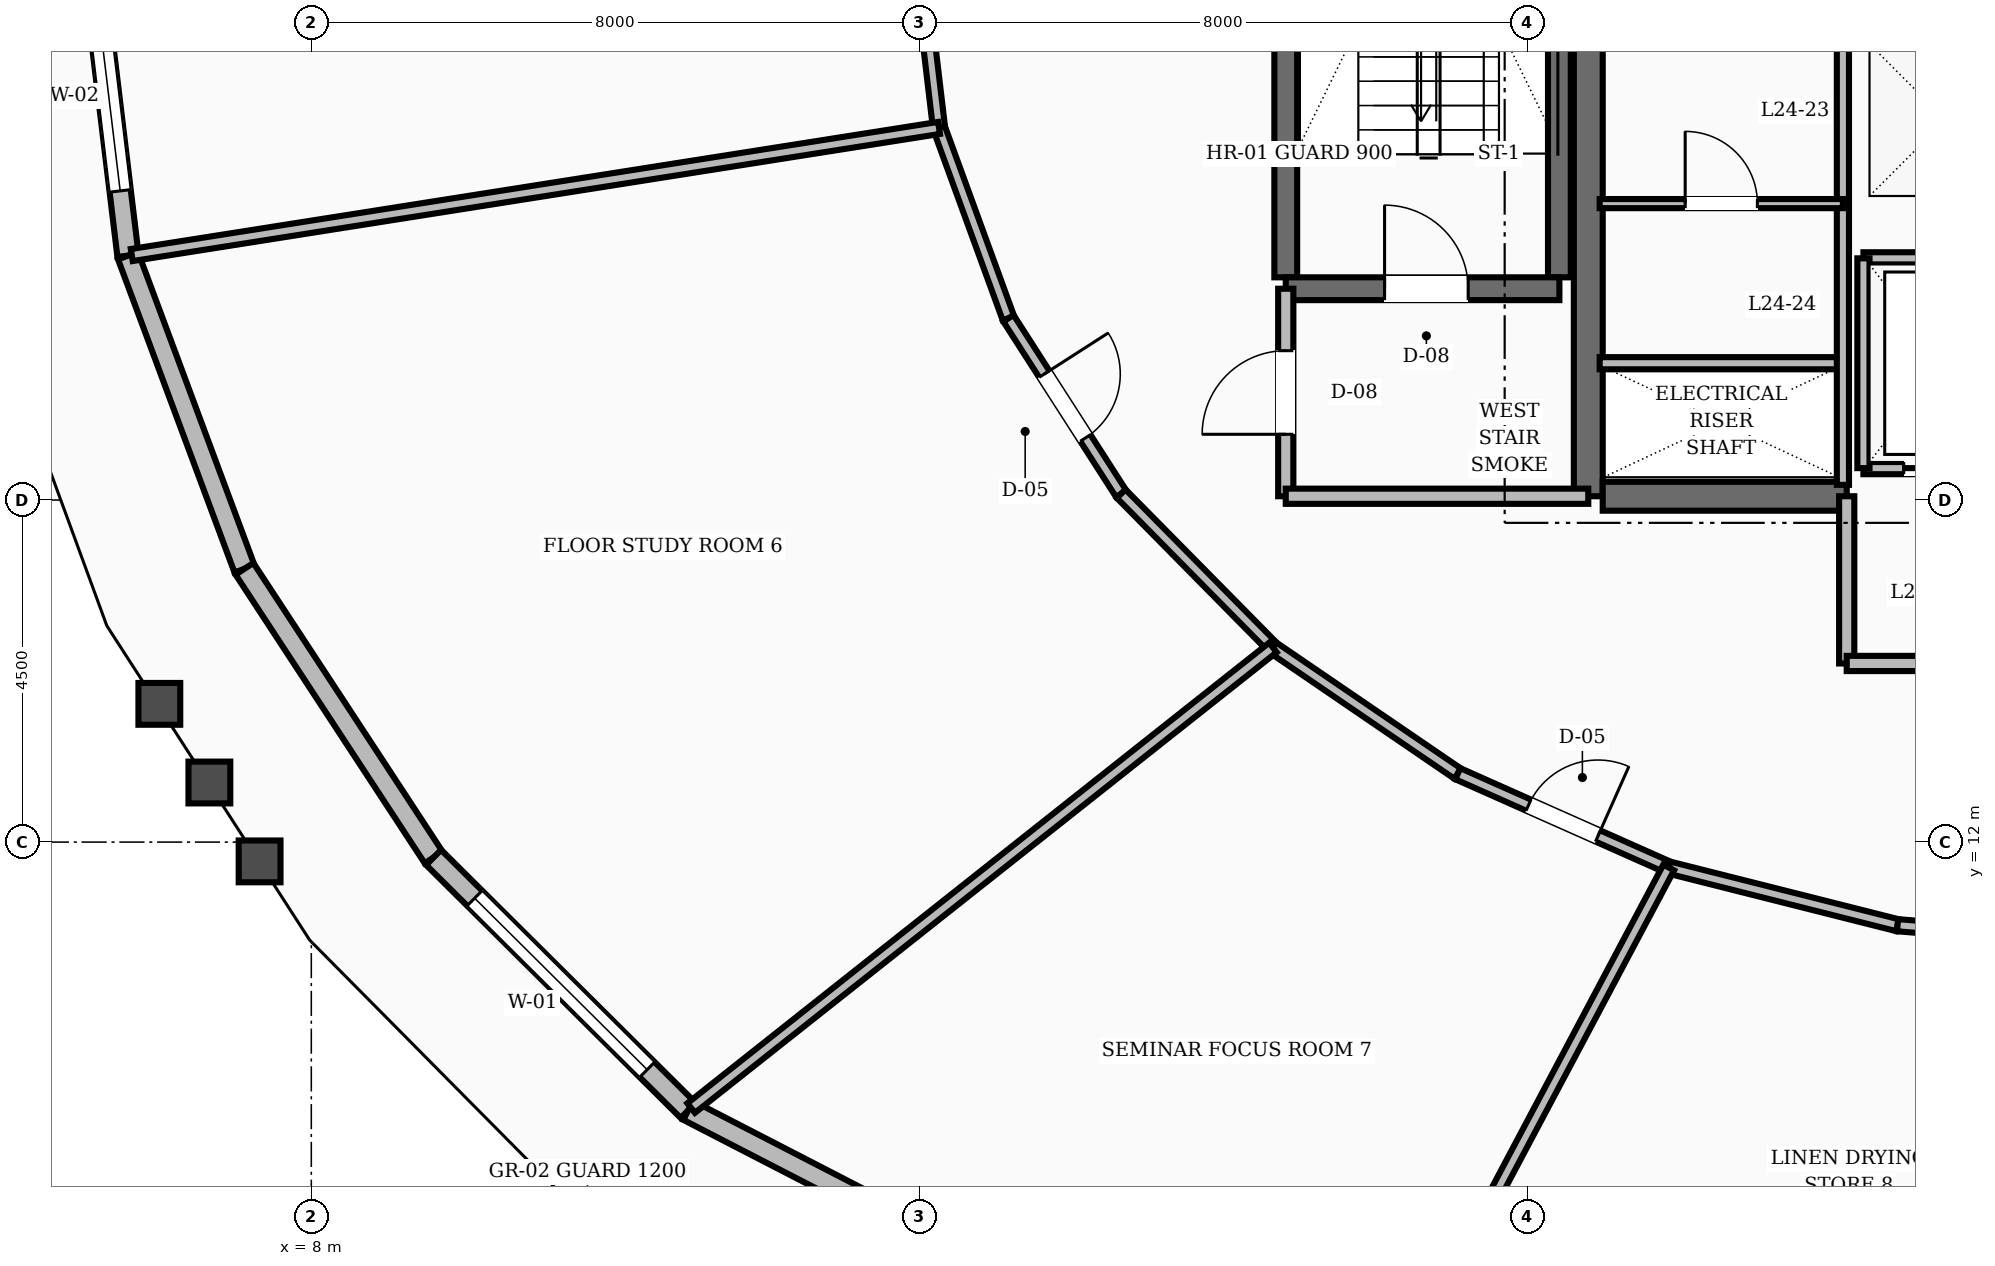
"""IFC4 building model, lengths in metres.
Left out: names, types, materials, properties, quantities, classifications, styles, units other than length and angle.
Written with IfcOpenShell. Run it as: python <this file> out.ifc"""

import sys

from ifc_helpers import new_model, si_unit, direction, frame, frame_2d, origin, place, context, subcontext, project, spatial, rectangle, extrude, element, fill, save


model = new_model("IFC4")
c1 = context("Model", 3, precision=1e-05, world=origin(), true_north=direction((0.0, 1.0)))
c2 = subcontext(c1, "Body", "Model", "MODEL_VIEW")
j1 = project(units=[si_unit("LENGTHUNIT", "METRE"), si_unit("PLANEANGLEUNIT", "RADIAN")], contexts=[c1])
p1 = place(None, origin())
s1 = spatial("IfcSite", under=j1, at=p1, CompositionType="ELEMENT")
p2 = place(p1, origin())
s2 = spatial("IfcBuilding", under=s1, at=p2, CompositionType="ELEMENT")
p3 = place(p2, frame((0.0, 0.0, 95.2)))
s3 = spatial("IfcBuildingStorey", under=s2, at=p3, CompositionType="ELEMENT", Elevation=95.2)
p4 = place(p3, frame((24.8, 16.55, 0.0), z_axis=(0.0, 0.0, 1.0), x_axis=(0.0, 1.0, 0.0)))
e1 = element("IfcWall", 1, at=p4, inside=s3, PredefinedType="SHEAR", context=c2, shape_type="SweptSolid", body=[
    extrude(rectangle(XDim=6.3, YDim=0.38, at=frame_2d((3.15, 0.0))), origin(), (0.0, 0.0, 1.0), 3.6),
])
p5 = place(p3, frame((24.99, 16.55, 0.0), z_axis=(0.0, 0.0, 1.0), x_axis=(1.0, 0.0, 0.0)))
e2 = element("IfcWall", 2, at=p5, inside=s3, PredefinedType="SHEAR", context=c2, shape_type="SweptSolid", body=[
    extrude(rectangle(XDim=3.21, YDim=0.38, at=frame_2d((1.605, 0.0))), origin(), (0.0, 0.0, 1.0), 3.6),
])
for number, where, z_axis, x_axis in (
    (3, (20.82, 19.43, 0.0), (0.0, 0.0, 1.0), (0.0, 1.0, 0.0)),
    (4, (24.42, 19.43, 0.0), (0.0, 0.0, 1.0), (0.0, 1.0, 0.0)),
):
    element("IfcWall", number, at=place(p3, frame(where, z_axis=z_axis, x_axis=x_axis)), inside=s3, PredefinedType="SHEAR", context=c2, shape_type="SweptSolid", body=[
        extrude(rectangle(XDim=8.74, YDim=0.3, at=frame_2d((4.37, 0.0))), origin(), (0.0, 0.0, 1.0), 3.6),
    ])
p6 = place(p3, frame((20.82, 19.28, 0.0), z_axis=(0.0, 0.0, 1.0), x_axis=(1.0, 0.0, 0.0)))
e5 = element("IfcWall", 5, at=p6, inside=s3, PredefinedType="SHEAR", context=c2, shape_type="SweptSolid", body=[
    extrude(rectangle(XDim=3.6, YDim=0.3, at=frame_2d((1.8, 0.0))), origin(), (0.0, 0.0, 1.0), 3.6),
])
p7 = place(p6, frame((1.3, 0.0, 0.0)))
e6 = element("IfcOpeningElement", 6, at=p7, cuts=e5, PredefinedType="OPENING", context=c2, shape_type="SweptSolid", body=[
    extrude(rectangle(XDim=1.1, YDim=2.1, at=frame_2d((0.55, 1.05))), frame((0.0, 0.16, 0.0), z_axis=(0.0, -1.0, 0.0), x_axis=(1.0, 0.0, 0.0)), (0.0, 0.0, 1.0), 0.32),
])
p8 = place(p3, frame((5.071, 24.0, 0.0), z_axis=(0.0, 0.0, 1.0), x_axis=(0.119925904923, -0.992782845001, 0.0)))
e7 = element("IfcWall", 7, at=p8, inside=s3, PredefinedType="STANDARD", context=c2, shape_type="SweptSolid", body=[
    extrude(rectangle(XDim=4.316, YDim=0.28, at=frame_2d((2.158, 0.0))), origin(), (0.0, 0.0, 1.0), 2.71),
])
p9 = place(p8, frame((0.858, 0.0, 0.8)))
e8 = element("IfcOpeningElement", 8, at=p9, cuts=e7, PredefinedType="OPENING", context=c2, shape_type="SweptSolid", body=[
    extrude(rectangle(XDim=2.6, YDim=1.65, at=frame_2d((1.3, 0.825))), frame((0.0, 0.15, 0.0), z_axis=(0.0, -1.0, 0.0), x_axis=(1.0, 0.0, 0.0)), (0.0, 0.0, 1.0), 0.3),
])
p10 = place(p3, frame((5.588, 19.715, 0.0), z_axis=(0.0, 0.0, 1.0), x_axis=(0.348632733014, -0.937259418449, 0.0)))
e9 = element("IfcWall", 9, at=p10, inside=s3, PredefinedType="STANDARD", context=c2, shape_type="SweptSolid", body=[
    extrude(rectangle(XDim=4.396, YDim=0.28, at=frame_2d((2.198, 0.0))), origin(), (0.0, 0.0, 1.0), 2.71),
])
p11 = place(p3, frame((7.121, 15.595, 0.0), z_axis=(0.0, 0.0, 1.0), x_axis=(0.548143021063, -0.836384617541, 0.0)))
e10 = element("IfcWall", 10, at=p11, inside=s3, PredefinedType="STANDARD", context=c2, shape_type="SweptSolid", body=[
    extrude(rectangle(XDim=4.54, YDim=0.28, at=frame_2d((2.27, 0.0))), origin(), (0.0, 0.0, 1.0), 2.71),
])
p12 = place(p3, frame((9.609, 11.798, 0.0), z_axis=(0.0, 0.0, 1.0), x_axis=(0.70930102543, -0.70490570669, 0.0)))
e11 = element("IfcWall", 11, at=p12, inside=s3, PredefinedType="STANDARD", context=c2, shape_type="SweptSolid", body=[
    extrude(rectangle(XDim=4.721, YDim=0.28, at=frame_2d((2.361, 0.0))), origin(), (0.0, 0.0, 1.0), 2.71),
])
p13 = place(p12, frame((0.761, 0.0, 0.8)))
e12 = element("IfcOpeningElement", 12, at=p13, cuts=e11, PredefinedType="OPENING", context=c2, shape_type="SweptSolid", body=[
    extrude(rectangle(XDim=3.2, YDim=1.65, at=frame_2d((1.6, 0.825))), frame((0.0, 0.15, 0.0), z_axis=(0.0, -1.0, 0.0), x_axis=(1.0, 0.0, 0.0)), (0.0, 0.0, 1.0), 0.3),
])
p14 = place(p3, frame((12.958, 8.47, 0.0), z_axis=(0.0, 0.0, 1.0), x_axis=(0.888710545959, -0.458468718127, 0.0)))
e13 = element("IfcWall", 13, at=p14, inside=s3, PredefinedType="STANDARD", context=c2, shape_type="SweptSolid", body=[
    extrude(rectangle(XDim=5.034, YDim=0.28, at=frame_2d((2.517, 0.0))), origin(), (0.0, 0.0, 1.0), 2.71),
])
p15 = place(p3, frame((20.82, 16.55, 0.0), z_axis=(0.0, 0.0, 1.0), x_axis=(0.0, 1.0, 0.0)))
e14 = element("IfcWall", 14, at=p15, inside=s3, PredefinedType="SOLIDWALL", context=c2, shape_type="SweptSolid", body=[
    extrude(rectangle(XDim=2.73, YDim=0.2, at=frame_2d((1.365, 0.0))), origin(), (0.0, 0.0, 1.0), 2.71),
])
p16 = place(p15, frame((0.815, 0.0, 0.0)))
e15 = element("IfcOpeningElement", 15, at=p16, cuts=e14, PredefinedType="OPENING", context=c2, shape_type="SweptSolid", body=[
    extrude(rectangle(XDim=1.1, YDim=2.1, at=frame_2d((0.55, 1.05))), frame((0.0, 0.11, 0.0), z_axis=(0.0, -1.0, 0.0), x_axis=(1.0, 0.0, 0.0)), (0.0, 0.0, 1.0), 0.22),
])
p17 = place(p3, frame((20.82, 16.55, 0.0), z_axis=(0.0, 0.0, 1.0), x_axis=(1.0, 0.0, 0.0)))
e16 = element("IfcWall", 16, at=p17, inside=s3, PredefinedType="SOLIDWALL", context=c2, shape_type="SweptSolid", body=[
    extrude(rectangle(XDim=3.98, YDim=0.2, at=frame_2d((1.99, 0.0))), origin(), (0.0, 0.0, 1.0), 2.71),
])
p18 = place(p3, frame((28.2, 14.35, 0.0), z_axis=(0.0, 0.0, 1.0), x_axis=(0.0, 1.0, 0.0)))
e17 = element("IfcWall", 17, at=p18, inside=s3, PredefinedType="SOLIDWALL", context=c2, shape_type="SweptSolid", body=[
    extrude(rectangle(XDim=2.2, YDim=0.2, at=frame_2d((1.1, 0.0))), origin(), (0.0, 0.0, 1.0), 2.71),
])
p19 = place(p3, frame((28.2, 14.35, 0.0), z_axis=(0.0, 0.0, 1.0), x_axis=(1.0, 0.0, 0.0)))
e18 = element("IfcWall", 18, at=p19, inside=s3, PredefinedType="SOLIDWALL", context=c2, shape_type="SweptSolid", body=[
    extrude(rectangle(XDim=7.6, YDim=0.2, at=frame_2d((3.8, 0.0))), origin(), (0.0, 0.0, 1.0), 2.71),
])
p20 = place(p19, frame((3.2, 0.0, 0.0)))
e19 = element("IfcOpeningElement", 19, at=p20, cuts=e18, PredefinedType="OPENING", context=c2, shape_type="SweptSolid", body=[
    extrude(rectangle(XDim=1.2, YDim=2.1, at=frame_2d((0.6, 1.05))), frame((0.0, 0.11, 0.0), z_axis=(0.0, -1.0, 0.0), x_axis=(1.0, 0.0, 0.0)), (0.0, 0.0, 1.0), 0.22),
])
p21 = place(p3, frame((28.42, 16.92, 0.0), z_axis=(0.0, 0.0, 1.0), x_axis=(1.0, 0.0, 0.0)))
e20 = element("IfcWall", 20, at=p21, inside=s3, PredefinedType="SOLIDWALL", context=c2, shape_type="SweptSolid", body=[
    extrude(rectangle(XDim=7.16, YDim=0.16, at=frame_2d((3.58, 0.0))), origin(), (0.0, 0.0, 1.0), 2.71),
])
p22 = place(p21, frame((0.53, 0.0, 0.0)))
e21 = element("IfcOpeningElement", 21, at=p22, cuts=e20, PredefinedType="OPENING", context=c2, shape_type="SweptSolid", body=[
    extrude(rectangle(XDim=1.1, YDim=2.15, at=frame_2d((0.55, 1.075))), frame((0.0, 0.09, 0.0), z_axis=(0.0, -1.0, 0.0), x_axis=(1.0, 0.0, 0.0)), (0.0, 0.0, 1.0), 0.18),
])
p23 = place(p21, frame((3.03, 0.0, 0.0)))
e22 = element("IfcOpeningElement", 22, at=p23, cuts=e20, PredefinedType="OPENING", context=c2, shape_type="SweptSolid", body=[
    extrude(rectangle(XDim=1.1, YDim=2.15, at=frame_2d((0.55, 1.075))), frame((0.0, 0.09, 0.0), z_axis=(0.0, -1.0, 0.0), x_axis=(1.0, 0.0, 0.0)), (0.0, 0.0, 1.0), 0.18),
])
p24 = place(p21, frame((5.53, 0.0, 0.0)))
e23 = element("IfcOpeningElement", 23, at=p24, cuts=e20, PredefinedType="OPENING", context=c2, shape_type="SweptSolid", body=[
    extrude(rectangle(XDim=1.1, YDim=2.15, at=frame_2d((0.55, 1.075))), frame((0.0, 0.09, 0.0), z_axis=(0.0, -1.0, 0.0), x_axis=(1.0, 0.0, 0.0)), (0.0, 0.0, 1.0), 0.18),
])
p25 = place(p3, frame((28.42, 19.68, 0.0), z_axis=(0.0, 0.0, 1.0), x_axis=(1.0, 0.0, 0.0)))
e24 = element("IfcWall", 24, at=p25, inside=s3, PredefinedType="SOLIDWALL", context=c2, shape_type="SweptSolid", body=[
    extrude(rectangle(XDim=7.16, YDim=0.16, at=frame_2d((3.58, 0.0))), origin(), (0.0, 0.0, 1.0), 2.71),
])
p26 = place(p3, frame((28.42, 16.92, 0.0), z_axis=(0.0, 0.0, 1.0), x_axis=(0.0, 1.0, 0.0)))
e25 = element("IfcWall", 25, at=p26, inside=s3, PredefinedType="SOLIDWALL", context=c2, shape_type="SweptSolid", body=[
    extrude(rectangle(XDim=2.76, YDim=0.16, at=frame_2d((1.38, 0.0))), origin(), (0.0, 0.0, 1.0), 2.71),
])
p27 = place(p3, frame((24.95, 18.3, 0.0), z_axis=(0.0, 0.0, 1.0), x_axis=(1.0, 0.0, 0.0)))
e26 = element("IfcWall", 26, at=p27, inside=s3, PredefinedType="SOLIDWALL", context=c2, shape_type="SweptSolid", body=[
    extrude(rectangle(XDim=3.2, YDim=0.16, at=frame_2d((1.6, 0.0))), origin(), (0.0, 0.0, 1.0), 2.71),
])
p28 = place(p3, frame((28.15, 16.7, 0.0), z_axis=(0.0, 0.0, 1.0), x_axis=(0.0, 1.0, 0.0)))
e27 = element("IfcWall", 27, at=p28, inside=s3, PredefinedType="SOLIDWALL", context=c2, shape_type="SweptSolid", body=[
    extrude(rectangle(XDim=6.05, YDim=0.16, at=frame_2d((3.025, 0.0))), origin(), (0.0, 0.0, 1.0), 2.71),
])
p29 = place(p3, frame((24.95, 20.4, 0.0), z_axis=(0.0, 0.0, 1.0), x_axis=(1.0, 0.0, 0.0)))
e28 = element("IfcWall", 28, at=p29, inside=s3, PredefinedType="PARTITIONING", context=c2, shape_type="SweptSolid", body=[
    extrude(rectangle(XDim=3.2, YDim=0.12, at=frame_2d((1.6, 0.0))), origin(), (0.0, 0.0, 1.0), 2.71),
])
p30 = place(p29, frame((1.125, 0.0, 0.0)))
e29 = element("IfcOpeningElement", 29, at=p30, cuts=e28, PredefinedType="OPENING", context=c2, shape_type="SweptSolid", body=[
    extrude(rectangle(XDim=0.95, YDim=2.1, at=frame_2d((0.475, 1.05))), frame((0.0, 0.07, 0.0), z_axis=(0.0, -1.0, 0.0), x_axis=(1.0, 0.0, 0.0)), (0.0, 0.0, 1.0), 0.14),
])
p31 = place(p3, frame((15.95, 24.0, 0.0), z_axis=(0.0, 0.0, 1.0), x_axis=(0.117570353762, -0.993064555765, 0.0)))
e30 = element("IfcWall", 30, at=p31, inside=s3, PredefinedType="SOLIDWALL", context=c2, shape_type="SweptSolid", body=[
    extrude(rectangle(XDim=2.623, YDim=0.16, at=frame_2d((1.312, 0.0))), origin(), (0.0, 0.0, 1.0), 2.71),
])
p32 = place(p3, frame((16.258, 21.396, 0.0), z_axis=(0.0, 0.0, 1.0), x_axis=(0.342617982381, -0.939474809747, 0.0)))
e31 = element("IfcWall", 31, at=p32, inside=s3, PredefinedType="SOLIDWALL", context=c2, shape_type="SweptSolid", body=[
    extrude(rectangle(XDim=2.666, YDim=0.16, at=frame_2d((1.333, 0.0))), origin(), (0.0, 0.0, 1.0), 2.71),
])
p33 = place(p3, frame((17.172, 18.891, 0.0), z_axis=(0.0, 0.0, 1.0), x_axis=(0.540595670038, -0.841282545603, 0.0)))
e32 = element("IfcWall", 32, at=p33, inside=s3, PredefinedType="SOLIDWALL", context=c2, shape_type="SweptSolid", body=[
    extrude(rectangle(XDim=2.744, YDim=0.16, at=frame_2d((1.372, 0.0))), origin(), (0.0, 0.0, 1.0), 2.71),
])
p34 = place(p33, frame((0.872, 0.0, 0.0)))
e33 = element("IfcOpeningElement", 33, at=p34, cuts=e32, PredefinedType="OPENING", context=c2, shape_type="SweptSolid", body=[
    extrude(rectangle(XDim=1.0, YDim=2.1, at=frame_2d((0.5, 1.05))), frame((0.0, 0.09, 0.0), z_axis=(0.0, -1.0, 0.0), x_axis=(1.0, 0.0, 0.0)), (0.0, 0.0, 1.0), 0.18),
])
p35 = place(p3, frame((18.655, 16.583, 0.0), z_axis=(0.0, 0.0, 1.0), x_axis=(0.702366174226, -0.711815816981, 0.0)))
e34 = element("IfcWall", 34, at=p35, inside=s3, PredefinedType="SOLIDWALL", context=c2, shape_type="SweptSolid", body=[
    extrude(rectangle(XDim=2.842, YDim=0.16, at=frame_2d((1.421, 0.0))), origin(), (0.0, 0.0, 1.0), 2.71),
])
p36 = place(p3, frame((20.651, 14.56, 0.0), z_axis=(0.0, 0.0, 1.0), x_axis=(0.825929039072, -0.563774088104, 0.0)))
e35 = element("IfcWall", 35, at=p36, inside=s3, PredefinedType="SOLIDWALL", context=c2, shape_type="SweptSolid", body=[
    extrude(rectangle(XDim=2.945, YDim=0.16, at=frame_2d((1.472, 0.0))), origin(), (0.0, 0.0, 1.0), 2.71),
])
p37 = place(p3, frame((23.083, 12.9, 0.0), z_axis=(0.0, 0.0, 1.0), x_axis=(0.913768445178, -0.406235434936, 0.0)))
e36 = element("IfcWall", 36, at=p37, inside=s3, PredefinedType="SOLIDWALL", context=c2, shape_type="SweptSolid", body=[
    extrude(rectangle(XDim=3.037, YDim=0.16, at=frame_2d((1.519, 0.0))), origin(), (0.0, 0.0, 1.0), 2.71),
])
p38 = place(p37, frame((1.018, 0.0, 0.0)))
e37 = element("IfcOpeningElement", 37, at=p38, cuts=e36, PredefinedType="OPENING", context=c2, shape_type="SweptSolid", body=[
    extrude(rectangle(XDim=1.0, YDim=2.1, at=frame_2d((0.5, 1.05))), frame((0.0, 0.09, 0.0), z_axis=(0.0, -1.0, 0.0), x_axis=(1.0, 0.0, 0.0)), (0.0, 0.0, 1.0), 0.18),
])
p39 = place(p3, frame((25.858, 11.666, 0.0), z_axis=(0.0, 0.0, 1.0), x_axis=(0.969608333194, -0.244662380029, 0.0)))
e38 = element("IfcWall", 38, at=p39, inside=s3, PredefinedType="SOLIDWALL", context=c2, shape_type="SweptSolid", body=[
    extrude(rectangle(XDim=3.105, YDim=0.16, at=frame_2d((1.553, 0.0))), origin(), (0.0, 0.0, 1.0), 2.71),
])
p40 = place(p3, frame((28.869, 10.906, 0.0), z_axis=(0.0, 0.0, 1.0), x_axis=(0.996658973252, -0.081675522876, 0.0)))
e39 = element("IfcWall", 39, at=p40, inside=s3, PredefinedType="SOLIDWALL", context=c2, shape_type="SweptSolid", body=[
    extrude(rectangle(XDim=3.142, YDim=0.16, at=frame_2d((1.571, 0.0))), origin(), (0.0, 0.0, 1.0), 2.71),
])
p41 = place(p40, frame((1.096, 0.0, 0.0)))
e40 = element("IfcOpeningElement", 40, at=p41, cuts=e39, PredefinedType="OPENING", context=c2, shape_type="SweptSolid", body=[
    extrude(rectangle(XDim=0.95, YDim=2.1, at=frame_2d((0.475, 1.05))), frame((0.0, 0.09, 0.0), z_axis=(0.0, -1.0, 0.0), x_axis=(1.0, 0.0, 0.0)), (0.0, 0.0, 1.0), 0.18),
])
p42 = place(p3, frame((16.258, 21.396, 0.0), z_axis=(0.0, 0.0, 1.0), x_axis=(-0.987828423439, -0.155547439211, 0.0)))
e41 = element("IfcWall", 41, at=p42, inside=s3, PredefinedType="SOLIDWALL", context=c2, shape_type="SweptSolid", body=[
    extrude(rectangle(XDim=10.751, YDim=0.16, at=frame_2d((5.376, 0.0))), origin(), (0.0, 0.0, 1.0), 2.71),
])
p43 = place(p3, frame((20.651, 14.56, 0.0), z_axis=(0.0, 0.0, 1.0), x_axis=(-0.784047853106, -0.620700381859, 0.0)))
e42 = element("IfcWall", 42, at=p43, inside=s3, PredefinedType="SOLIDWALL", context=c2, shape_type="SweptSolid", body=[
    extrude(rectangle(XDim=9.761, YDim=0.16, at=frame_2d((4.881, 0.0))), origin(), (0.0, 0.0, 1.0), 2.71),
])
p44 = place(p3, frame((25.858, 11.666, 0.0), z_axis=(0.0, 0.0, 1.0), x_axis=(-0.468857429223, -0.883273859605, 0.0)))
e43 = element("IfcWall", 43, at=p44, inside=s3, PredefinedType="SOLIDWALL", context=c2, shape_type="SweptSolid", body=[
    extrude(rectangle(XDim=8.373, YDim=0.16, at=frame_2d((4.186, 0.0))), origin(), (0.0, 0.0, 1.0), 2.71),
])
p45 = place(p9, origin())
e44 = element("IfcWindow", 44, at=p45, inside=s3, PartitioningType="SINGLE_PANEL", PredefinedType="WINDOW", context=c2, shape_type="SweptSolid", body=[
    extrude(rectangle(XDim=2.6, YDim=1.65, at=frame_2d((1.3, 0.825))), frame((0.0, 0.03, 0.0), z_axis=(0.0, -1.0, 0.0), x_axis=(1.0, 0.0, 0.0)), (0.0, 0.0, 1.0), 0.06),
])
fill(e8, e44)
p46 = place(p13, origin())
e45 = element("IfcWindow", 45, at=p46, inside=s3, PartitioningType="SINGLE_PANEL", PredefinedType="WINDOW", context=c2, shape_type="SweptSolid", body=[
    extrude(rectangle(XDim=3.2, YDim=1.65, at=frame_2d((1.6, 0.825))), frame((0.0, 0.03, 0.0), z_axis=(0.0, -1.0, 0.0), x_axis=(1.0, 0.0, 0.0)), (0.0, 0.0, 1.0), 0.06),
])
fill(e12, e45)
p47 = place(p7, origin())
e46 = element("IfcDoor", 46, at=p47, inside=s3, OperationType="SINGLE_SWING_LEFT", PredefinedType="DOOR", context=c2, shape_type="SweptSolid", body=[
    extrude(rectangle(XDim=1.1, YDim=2.1, at=frame_2d((0.55, 1.05))), frame((0.0, 0.025, 0.0), z_axis=(0.0, -1.0, 0.0), x_axis=(1.0, 0.0, 0.0)), (0.0, 0.0, 1.0), 0.05),
])
fill(e6, e46)
p48 = place(p16, origin())
e47 = element("IfcDoor", 47, at=p48, inside=s3, OperationType="SINGLE_SWING_LEFT", PredefinedType="DOOR", context=c2, shape_type="SweptSolid", body=[
    extrude(rectangle(XDim=1.1, YDim=2.1, at=frame_2d((0.55, 1.05))), frame((0.0, 0.025, 0.0), z_axis=(0.0, -1.0, 0.0), x_axis=(1.0, 0.0, 0.0)), (0.0, 0.0, 1.0), 0.05),
])
fill(e15, e47)
p49 = place(p22, origin())
e48 = element("IfcDoor", 48, at=p49, inside=s3, OperationType="SLIDING_TO_RIGHT", PredefinedType="DOOR", context=c2, shape_type="SweptSolid", body=[
    extrude(rectangle(XDim=1.1, YDim=2.15, at=frame_2d((0.55, 1.075))), frame((0.0, 0.025, 0.0), z_axis=(0.0, -1.0, 0.0), x_axis=(1.0, 0.0, 0.0)), (0.0, 0.0, 1.0), 0.05),
])
fill(e21, e48)
p50 = place(p30, origin())
e49 = element("IfcDoor", 49, at=p50, inside=s3, OperationType="SINGLE_SWING_LEFT", PredefinedType="DOOR", context=c2, shape_type="SweptSolid", body=[
    extrude(rectangle(XDim=0.95, YDim=2.1, at=frame_2d((0.475, 1.05))), frame((0.0, 0.025, 0.0), z_axis=(0.0, -1.0, 0.0), x_axis=(1.0, 0.0, 0.0)), (0.0, 0.0, 1.0), 0.05),
])
fill(e29, e49)
p51 = place(p34, origin())
e50 = element("IfcDoor", 50, at=p51, inside=s3, OperationType="SINGLE_SWING_LEFT", PredefinedType="DOOR", context=c2, shape_type="SweptSolid", body=[
    extrude(rectangle(XDim=1.0, YDim=2.1, at=frame_2d((0.5, 1.05))), frame((0.0, 0.025, 0.0), z_axis=(0.0, -1.0, 0.0), x_axis=(1.0, 0.0, 0.0)), (0.0, 0.0, 1.0), 0.05),
])
fill(e33, e50)
p52 = place(p38, origin())
e51 = element("IfcDoor", 51, at=p52, inside=s3, OperationType="SINGLE_SWING_RIGHT", PredefinedType="DOOR", context=c2, shape_type="SweptSolid", body=[
    extrude(rectangle(XDim=1.0, YDim=2.1, at=frame_2d((0.5, 1.05))), frame((0.0, 0.025, 0.0), z_axis=(0.0, -1.0, 0.0), x_axis=(1.0, 0.0, 0.0)), (0.0, 0.0, 1.0), 0.05),
])
fill(e37, e51)
save(model, sys.argv[1])
